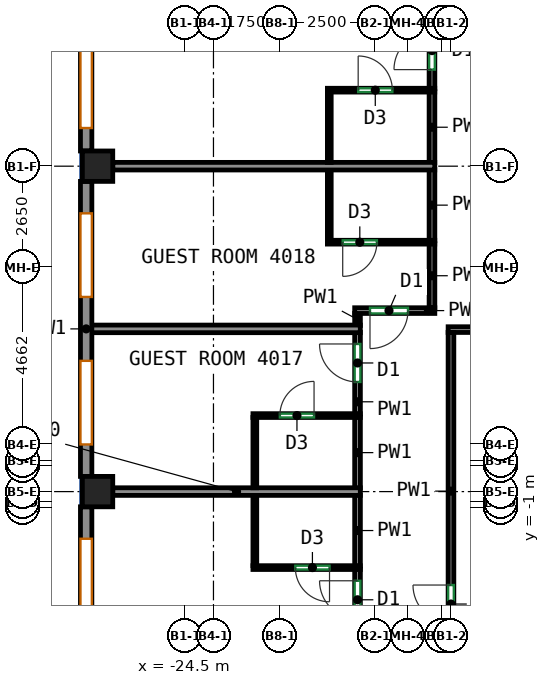
"""IFC4 building model, lengths in metres.
Left out: names, types, materials, properties, quantities, classifications, styles, units other than length and angle.
Written with IfcOpenShell. Run it as: python <this file> out.ifc"""

import sys

from ifc_helpers import new_model, si_unit, direction, frame, frame_2d, origin, origin_2d, place, context, subcontext, project, spatial, rectangle, extrude, source, transform, mapped, element, fill, save


model = new_model("IFC4")
c1 = context("Model", 3, precision=1e-05, world=origin(), true_north=direction((0.0, 1.0)))
c2 = subcontext(c1, "Body", "Model", "MODEL_VIEW")
j1 = project(units=[si_unit("LENGTHUNIT", "METRE"), si_unit("PLANEANGLEUNIT", "RADIAN")], contexts=[c1])
p1 = place(None, origin())
s1 = spatial("IfcSite", under=j1, at=p1, CompositionType="ELEMENT")
p2 = place(p1, origin())
s2 = spatial("IfcBuilding", under=s1, at=p2, CompositionType="ELEMENT")
p3 = place(p2, frame((0.0, 0.0, 171.9)))
s3 = spatial("IfcBuildingStorey", under=s2, at=p3, CompositionType="ELEMENT", Elevation=171.9)
m1 = source(origin(), c2, "Body", "SweptSolid", [
    extrude(rectangle(XDim=0.8, YDim=0.8, at=origin_2d()), origin(), (0.0, 0.0, 1.0), 3.12),
])
for number, where, z_axis, x_axis in (
    (1, (-26.8, -0.562, 0.0), (0.0, 0.0, 1.0), (1.0, 0.0, 0.0)),
    (2, (-26.8, 8.0, 0.0), (0.0, 0.0, 1.0), (1.0, 0.0, 0.0)),
):
    element("IfcColumn", number, at=place(p3, frame(where, z_axis=z_axis, x_axis=x_axis)), inside=s3, PredefinedType="COLUMN", context=c2, shape_type="MappedRepresentation", body=[
        mapped(m1, transform((0.0, 0.0, 0.0))),
    ])
m2 = source(origin(), c2, "Body", "SweptSolid", [
    extrude(rectangle(XDim=13.632, YDim=0.3, at=frame_2d((6.816, 0.0))), origin(), (0.0, 0.0, 1.0), 3.12),
])
p4 = place(p3, frame((-27.1, 22.032, 0.0), z_axis=(0.0, 0.0, 1.0), x_axis=(0.0, -1.0, 0.0)))
e3 = element("IfcWall", 3, at=p4, inside=s3, PredefinedType="SOLIDWALL", context=c2, shape_type="MappedRepresentation", body=[
    mapped(m2, transform((0.0, 0.0, 0.0))),
])
p5 = place(p4, frame((0.604, 0.0, 0.85)))
e4 = element("IfcOpeningElement", 4, at=p5, cuts=e3, PredefinedType="OPENING", context=c2, shape_type="SweptSolid", body=[
    extrude(rectangle(XDim=2.2, YDim=1.95, at=frame_2d((1.1, 0.975))), frame((0.0, 0.16, 0.0), z_axis=(0.0, -1.0, 0.0), x_axis=(1.0, 0.0, 0.0)), (0.0, 0.0, 1.0), 0.32),
])
p6 = place(p4, frame((4.012, 0.0, 0.85)))
e5 = element("IfcOpeningElement", 5, at=p6, cuts=e3, PredefinedType="OPENING", context=c2, shape_type="SweptSolid", body=[
    extrude(rectangle(XDim=2.2, YDim=1.95, at=frame_2d((1.1, 0.975))), frame((0.0, 0.16, 0.0), z_axis=(0.0, -1.0, 0.0), x_axis=(1.0, 0.0, 0.0)), (0.0, 0.0, 1.0), 0.32),
])
p7 = place(p4, frame((7.42, 0.0, 0.85)))
e6 = element("IfcOpeningElement", 6, at=p7, cuts=e3, PredefinedType="OPENING", context=c2, shape_type="SweptSolid", body=[
    extrude(rectangle(XDim=2.2, YDim=1.95, at=frame_2d((1.1, 0.975))), frame((0.0, 0.16, 0.0), z_axis=(0.0, -1.0, 0.0), x_axis=(1.0, 0.0, 0.0)), (0.0, 0.0, 1.0), 0.32),
])
p8 = place(p4, frame((10.828, 0.0, 0.85)))
e7 = element("IfcOpeningElement", 7, at=p8, cuts=e3, PredefinedType="OPENING", context=c2, shape_type="SweptSolid", body=[
    extrude(rectangle(XDim=2.2, YDim=1.95, at=frame_2d((1.1, 0.975))), frame((0.0, 0.16, 0.0), z_axis=(0.0, -1.0, 0.0), x_axis=(1.0, 0.0, 0.0)), (0.0, 0.0, 1.0), 0.32),
])
m3 = source(origin(), c2, "Body", "SweptSolid", [
    extrude(rectangle(XDim=7.763, YDim=0.3, at=frame_2d((3.881, 0.0))), origin(), (0.0, 0.0, 1.0), 3.12),
])
p9 = place(p3, frame((-27.1, 7.6, 0.0), z_axis=(0.0, 0.0, 1.0), x_axis=(0.0, -1.0, 0.0)))
e8 = element("IfcWall", 8, at=p9, inside=s3, PredefinedType="SOLIDWALL", context=c2, shape_type="MappedRepresentation", body=[
    mapped(m3, transform((0.0, 0.0, 0.0))),
])
p10 = place(p9, frame((0.841, 0.0, 0.85)))
e9 = element("IfcOpeningElement", 9, at=p10, cuts=e8, PredefinedType="OPENING", context=c2, shape_type="SweptSolid", body=[
    extrude(rectangle(XDim=2.2, YDim=1.95, at=frame_2d((1.1, 0.975))), frame((0.0, 0.16, 0.0), z_axis=(0.0, -1.0, 0.0), x_axis=(1.0, 0.0, 0.0)), (0.0, 0.0, 1.0), 0.32),
])
p11 = place(p9, frame((4.722, 0.0, 0.85)))
e10 = element("IfcOpeningElement", 10, at=p11, cuts=e8, PredefinedType="OPENING", context=c2, shape_type="SweptSolid", body=[
    extrude(rectangle(XDim=2.2, YDim=1.95, at=frame_2d((1.1, 0.975))), frame((0.0, 0.16, 0.0), z_axis=(0.0, -1.0, 0.0), x_axis=(1.0, 0.0, 0.0)), (0.0, 0.0, 1.0), 0.32),
])
p12 = place(p3, frame((-27.1, -0.962, 0.0), z_axis=(0.0, 0.0, 1.0), x_axis=(0.0, -1.0, 0.0)))
e11 = element("IfcWall", 11, at=p12, inside=s3, PredefinedType="SOLIDWALL", context=c2, shape_type="MappedRepresentation", body=[
    mapped(m3, transform((0.0, 0.0, 0.0))),
])
p13 = place(p12, frame((0.841, 0.0, 0.85)))
e12 = element("IfcOpeningElement", 12, at=p13, cuts=e11, PredefinedType="OPENING", context=c2, shape_type="SweptSolid", body=[
    extrude(rectangle(XDim=2.2, YDim=1.95, at=frame_2d((1.1, 0.975))), frame((0.0, 0.16, 0.0), z_axis=(0.0, -1.0, 0.0), x_axis=(1.0, 0.0, 0.0)), (0.0, 0.0, 1.0), 0.32),
])
p14 = place(p12, frame((4.722, 0.0, 0.85)))
e13 = element("IfcOpeningElement", 13, at=p14, cuts=e11, PredefinedType="OPENING", context=c2, shape_type="SweptSolid", body=[
    extrude(rectangle(XDim=2.2, YDim=1.95, at=frame_2d((1.1, 0.975))), frame((0.0, 0.16, 0.0), z_axis=(0.0, -1.0, 0.0), x_axis=(1.0, 0.0, 0.0)), (0.0, 0.0, 1.0), 0.32),
])
p15 = place(p3, frame((-19.959, -4.753, 0.0), z_axis=(0.0, 0.0, 1.0), x_axis=(0.0, 1.0, 0.0)))
e14 = element("IfcWall", 14, at=p15, inside=s3, PredefinedType="PARTITIONING", context=c2, shape_type="SweptSolid", body=[
    extrude(rectangle(XDim=2.151, YDim=0.15, at=frame_2d((1.075, 0.0))), origin(), (0.0, 0.0, 1.0), 3.12),
])
p16 = place(p15, frame((0.844, 0.0, 0.0)))
e15 = element("IfcOpeningElement", 15, at=p16, cuts=e14, PredefinedType="OPENING", context=c2, shape_type="SweptSolid", body=[
    extrude(rectangle(XDim=1.0, YDim=2.1, at=frame_2d((0.5, 1.05))), frame((0.0, 0.085, 0.0), z_axis=(0.0, -1.0, 0.0), x_axis=(1.0, 0.0, 0.0)), (0.0, 0.0, 1.0), 0.17),
])
p17 = place(p3, frame((-19.959, -2.522, 0.0), z_axis=(0.0, 0.0, 1.0), x_axis=(0.0, 1.0, 0.0)))
e16 = element("IfcWall", 16, at=p17, inside=s3, PredefinedType="PARTITIONING", context=c2, shape_type="SweptSolid", body=[
    extrude(rectangle(XDim=1.87, YDim=0.15, at=frame_2d((0.935, 0.0))), origin(), (0.0, 0.0, 1.0), 3.12),
])
p18 = place(p3, frame((-19.959, 1.478, 0.0), z_axis=(0.0, 0.0, 1.0), x_axis=(0.0, 1.0, 0.0)))
e17 = element("IfcWall", 17, at=p18, inside=s3, PredefinedType="PARTITIONING", context=c2, shape_type="SweptSolid", body=[
    extrude(rectangle(XDim=2.151, YDim=0.15, at=frame_2d((1.075, 0.0))), origin(), (0.0, 0.0, 1.0), 3.12),
])
p19 = place(p18, frame((0.844, 0.0, 0.0)))
e18 = element("IfcOpeningElement", 18, at=p19, cuts=e17, PredefinedType="OPENING", context=c2, shape_type="SweptSolid", body=[
    extrude(rectangle(XDim=1.0, YDim=2.1, at=frame_2d((0.5, 1.05))), frame((0.0, 0.085, 0.0), z_axis=(0.0, -1.0, 0.0), x_axis=(1.0, 0.0, 0.0)), (0.0, 0.0, 1.0), 0.17),
])
p20 = place(p3, frame((-19.959, -0.472, 0.0), z_axis=(0.0, 0.0, 1.0), x_axis=(0.0, 1.0, 0.0)))
e19 = element("IfcWall", 19, at=p20, inside=s3, PredefinedType="PARTITIONING", context=c2, shape_type="SweptSolid", body=[
    extrude(rectangle(XDim=1.87, YDim=0.15, at=frame_2d((0.935, 0.0))), origin(), (0.0, 0.0, 1.0), 3.12),
])
p21 = place(p3, frame((-19.959, 3.809, 0.0), z_axis=(0.0, 0.0, 1.0), x_axis=(0.0, 1.0, 0.0)))
e20 = element("IfcWall", 20, at=p21, inside=s3, PredefinedType="PARTITIONING", context=c2, shape_type="SweptSolid", body=[
    extrude(rectangle(XDim=0.316, YDim=0.15, at=frame_2d((0.158, 0.0))), origin(), (0.0, 0.0, 1.0), 3.12),
])
p22 = place(p3, frame((-17.925, 4.2, 0.0), z_axis=(0.0, 0.0, 1.0), x_axis=(-1.0, 0.0, 0.0)))
e21 = element("IfcWall", 21, at=p22, inside=s3, PredefinedType="PARTITIONING", context=c2, shape_type="SweptSolid", body=[
    extrude(rectangle(XDim=2.109, YDim=0.15, at=frame_2d((1.054, 0.0))), origin(), (0.0, 0.0, 1.0), 3.12),
])
p23 = place(p22, frame((0.706, 0.0, 0.0)))
e22 = element("IfcOpeningElement", 22, at=p23, cuts=e21, PredefinedType="OPENING", context=c2, shape_type="SweptSolid", body=[
    extrude(rectangle(XDim=1.0, YDim=2.1, at=frame_2d((0.5, 1.05))), frame((0.0, 0.085, 0.0), z_axis=(0.0, -1.0, 0.0), x_axis=(1.0, 0.0, 0.0)), (0.0, 0.0, 1.0), 0.17),
])
p24 = place(p3, frame((-18.0, 4.275, 0.0), z_axis=(0.0, 0.0, 1.0), x_axis=(0.0, 1.0, 0.0)))
e23 = element("IfcWall", 23, at=p24, inside=s3, PredefinedType="PARTITIONING", context=c2, shape_type="SweptSolid", body=[
    extrude(rectangle(XDim=1.685, YDim=0.15, at=frame_2d((0.843, 0.0))), origin(), (0.0, 0.0, 1.0), 3.12),
])
p25 = place(p3, frame((-18.0, 6.04, 0.0), z_axis=(0.0, 0.0, 1.0), x_axis=(0.0, 1.0, 0.0)))
e24 = element("IfcWall", 24, at=p25, inside=s3, PredefinedType="PARTITIONING", context=c2, shape_type="SweptSolid", body=[
    extrude(rectangle(XDim=1.87, YDim=0.15, at=frame_2d((0.935, 0.0))), origin(), (0.0, 0.0, 1.0), 3.12),
])
p26 = place(p3, frame((-18.0, 10.04, 0.0), z_axis=(0.0, 0.0, 1.0), x_axis=(0.0, 1.0, 0.0)))
e25 = element("IfcWall", 25, at=p26, inside=s3, PredefinedType="PARTITIONING", context=c2, shape_type="SweptSolid", body=[
    extrude(rectangle(XDim=4.707, YDim=0.15, at=frame_2d((2.354, 0.0))), origin(), (0.0, 0.0, 1.0), 3.12),
])
p27 = place(p26, frame((0.501, 0.0, 0.0)))
e26 = element("IfcOpeningElement", 26, at=p27, cuts=e25, PredefinedType="OPENING", context=c2, shape_type="SweptSolid", body=[
    extrude(rectangle(XDim=1.0, YDim=2.1, at=frame_2d((0.5, 1.05))), frame((0.0, 0.085, 0.0), z_axis=(0.0, -1.0, 0.0), x_axis=(1.0, 0.0, 0.0)), (0.0, 0.0, 1.0), 0.17),
])
p28 = place(p3, frame((-18.0, 8.09, 0.0), z_axis=(0.0, 0.0, 1.0), x_axis=(0.0, 1.0, 0.0)))
e27 = element("IfcWall", 27, at=p28, inside=s3, PredefinedType="PARTITIONING", context=c2, shape_type="SweptSolid", body=[
    extrude(rectangle(XDim=1.87, YDim=0.15, at=frame_2d((0.935, 0.0))), origin(), (0.0, 0.0, 1.0), 3.12),
])
p29 = place(p3, frame((-17.575, 3.7, 0.0), z_axis=(0.0, 0.0, 1.0), x_axis=(1.0, 0.0, 0.0)))
e28 = element("IfcWall", 28, at=p29, inside=s3, PredefinedType="PARTITIONING", context=c2, shape_type="SweptSolid", body=[
    extrude(rectangle(XDim=33.85, YDim=0.15, at=frame_2d((16.925, 0.0))), origin(), (0.0, 0.0, 1.0), 3.12),
])
p30 = place(p29, frame((6.596, 0.0, 0.0)))
e29 = element("IfcOpeningElement", 29, at=p30, cuts=e28, PredefinedType="OPENING", context=c2, shape_type="SweptSolid", body=[
    extrude(rectangle(XDim=0.9, YDim=2.1, at=frame_2d((0.45, 1.05))), frame((0.0, 0.085, 0.0), z_axis=(0.0, -1.0, 0.0), x_axis=(1.0, 0.0, 0.0)), (0.0, 0.0, 1.0), 0.17),
])
p31 = place(p29, frame((10.082, 0.0, 0.0)))
e30 = element("IfcOpeningElement", 30, at=p31, cuts=e28, PredefinedType="OPENING", context=c2, shape_type="SweptSolid", body=[
    extrude(rectangle(XDim=0.9, YDim=2.1, at=frame_2d((0.45, 1.05))), frame((0.0, 0.085, 0.0), z_axis=(0.0, -1.0, 0.0), x_axis=(1.0, 0.0, 0.0)), (0.0, 0.0, 1.0), 0.17),
])
p32 = place(p29, frame((21.767, 0.0, 0.0)))
e31 = element("IfcOpeningElement", 31, at=p32, cuts=e28, PredefinedType="OPENING", context=c2, shape_type="SweptSolid", body=[
    extrude(rectangle(XDim=0.9, YDim=2.1, at=frame_2d((0.45, 1.05))), frame((0.0, 0.085, 0.0), z_axis=(0.0, -1.0, 0.0), x_axis=(1.0, 0.0, 0.0)), (0.0, 0.0, 1.0), 0.17),
])
p33 = place(p29, frame((29.649, 0.0, 0.0)))
e32 = element("IfcOpeningElement", 32, at=p33, cuts=e28, PredefinedType="OPENING", context=c2, shape_type="SweptSolid", body=[
    extrude(rectangle(XDim=0.9, YDim=2.1, at=frame_2d((0.45, 1.05))), frame((0.0, 0.085, 0.0), z_axis=(0.0, -1.0, 0.0), x_axis=(1.0, 0.0, 0.0)), (0.0, 0.0, 1.0), 0.17),
])
p34 = place(p3, frame((-17.5, -4.725, 0.0), z_axis=(0.0, 0.0, 1.0), x_axis=(0.0, 1.0, 0.0)))
e33 = element("IfcWall", 33, at=p34, inside=s3, PredefinedType="PARTITIONING", context=c2, shape_type="SweptSolid", body=[
    extrude(rectangle(XDim=8.35, YDim=0.15, at=frame_2d((4.175, 0.0))), origin(), (0.0, 0.0, 1.0), 3.12),
])
p35 = place(p34, frame((0.704, 0.0, 0.0)))
e34 = element("IfcOpeningElement", 34, at=p35, cuts=e33, PredefinedType="OPENING", context=c2, shape_type="SweptSolid", body=[
    extrude(rectangle(XDim=1.0, YDim=2.1, at=frame_2d((0.5, 1.05))), frame((0.0, 0.085, 0.0), z_axis=(0.0, -1.0, 0.0), x_axis=(1.0, 0.0, 0.0)), (0.0, 0.0, 1.0), 0.17),
])
p36 = place(p3, frame((-19.886, -2.562, 0.0), z_axis=(0.0, 0.0, 1.0), x_axis=(-1.0, 0.0, 0.0)))
e35 = element("IfcWall", 35, at=p36, inside=s3, PredefinedType="PARTITIONING", context=c2, shape_type="SweptSolid", body=[
    extrude(rectangle(XDim=2.825, YDim=0.1, at=frame_2d((1.413, 0.0))), origin(), (0.0, 0.0, 1.0), 3.12),
])
p37 = place(p36, frame((0.81, 0.0, 0.0)))
e36 = element("IfcOpeningElement", 36, at=p37, cuts=e35, PredefinedType="OPENING", context=c2, shape_type="SweptSolid", body=[
    extrude(rectangle(XDim=0.9, YDim=2.1, at=frame_2d((0.45, 1.05))), frame((0.0, 0.06, 0.0), z_axis=(0.0, -1.0, 0.0), x_axis=(1.0, 0.0, 0.0)), (0.0, 0.0, 1.0), 0.12),
])
p38 = place(p3, frame((-22.661, -2.512, 0.0), z_axis=(0.0, 0.0, 1.0), x_axis=(0.0, 1.0, 0.0)))
e37 = element("IfcWall", 37, at=p38, inside=s3, PredefinedType="PARTITIONING", context=c2, shape_type="SweptSolid", body=[
    extrude(rectangle(XDim=1.85, YDim=0.1, at=frame_2d((0.925, 0.0))), origin(), (0.0, 0.0, 1.0), 3.12),
])
p39 = place(p3, frame((-26.4, -0.562, 0.0), z_axis=(0.0, 0.0, 1.0), x_axis=(1.0, 0.0, 0.0)))
e38 = element("IfcWall", 38, at=p39, inside=s3, PredefinedType="PARTITIONING", context=c2, shape_type="SweptSolid", body=[
    extrude(rectangle(XDim=6.514, YDim=0.2, at=frame_2d((3.257, 0.0))), origin(), (0.0, 0.0, 1.0), 2.52),
])
p40 = place(p3, frame((-22.711, 1.438, 0.0), z_axis=(0.0, 0.0, 1.0), x_axis=(1.0, 0.0, 0.0)))
e39 = element("IfcWall", 39, at=p40, inside=s3, PredefinedType="PARTITIONING", context=c2, shape_type="SweptSolid", body=[
    extrude(rectangle(XDim=2.825, YDim=0.1, at=frame_2d((1.413, 0.0))), origin(), (0.0, 0.0, 1.0), 3.12),
])
p41 = place(p40, frame((0.708, 0.0, 0.0)))
e40 = element("IfcOpeningElement", 40, at=p41, cuts=e39, PredefinedType="OPENING", context=c2, shape_type="SweptSolid", body=[
    extrude(rectangle(XDim=0.9, YDim=2.1, at=frame_2d((0.45, 1.05))), frame((0.0, 0.06, 0.0), z_axis=(0.0, -1.0, 0.0), x_axis=(1.0, 0.0, 0.0)), (0.0, 0.0, 1.0), 0.12),
])
p42 = place(p3, frame((-22.661, -0.462, 0.0), z_axis=(0.0, 0.0, 1.0), x_axis=(0.0, 1.0, 0.0)))
e41 = element("IfcWall", 41, at=p42, inside=s3, PredefinedType="PARTITIONING", context=c2, shape_type="SweptSolid", body=[
    extrude(rectangle(XDim=1.85, YDim=0.1, at=frame_2d((0.925, 0.0))), origin(), (0.0, 0.0, 1.0), 3.12),
])
p43 = place(p3, frame((-27.0, 3.719, 0.0), z_axis=(0.0, 0.0, 1.0), x_axis=(1.0, 0.0, 0.0)))
e42 = element("IfcWall", 42, at=p43, inside=s3, PredefinedType="PARTITIONING", context=c2, shape_type="SweptSolid", body=[
    extrude(rectangle(XDim=7.114, YDim=0.2, at=frame_2d((3.557, 0.0))), origin(), (0.0, 0.0, 1.0), 3.12),
])
p44 = place(p3, frame((-17.927, 6.0, 0.0), z_axis=(0.0, 0.0, 1.0), x_axis=(-1.0, 0.0, 0.0)))
e43 = element("IfcWall", 43, at=p44, inside=s3, PredefinedType="PARTITIONING", context=c2, shape_type="SweptSolid", body=[
    extrude(rectangle(XDim=2.825, YDim=0.1, at=frame_2d((1.413, 0.0))), origin(), (0.0, 0.0, 1.0), 3.12),
])
p45 = place(p44, frame((1.522, 0.0, 0.0)))
e44 = element("IfcOpeningElement", 44, at=p45, cuts=e43, PredefinedType="OPENING", context=c2, shape_type="SweptSolid", body=[
    extrude(rectangle(XDim=0.9, YDim=2.1, at=frame_2d((0.45, 1.05))), frame((0.0, 0.06, 0.0), z_axis=(0.0, -1.0, 0.0), x_axis=(1.0, 0.0, 0.0)), (0.0, 0.0, 1.0), 0.12),
])
p46 = place(p3, frame((-20.702, 6.05, 0.0), z_axis=(0.0, 0.0, 1.0), x_axis=(0.0, 1.0, 0.0)))
e45 = element("IfcWall", 45, at=p46, inside=s3, PredefinedType="PARTITIONING", context=c2, shape_type="SweptSolid", body=[
    extrude(rectangle(XDim=1.85, YDim=0.1, at=frame_2d((0.925, 0.0))), origin(), (0.0, 0.0, 1.0), 3.12),
])
p47 = place(p3, frame((-26.4, 8.0, 0.0), z_axis=(0.0, 0.0, 1.0), x_axis=(1.0, 0.0, 0.0)))
e46 = element("IfcWall", 46, at=p47, inside=s3, PredefinedType="PARTITIONING", context=c2, shape_type="SweptSolid", body=[
    extrude(rectangle(XDim=8.473, YDim=0.2, at=frame_2d((4.236, 0.0))), origin(), (0.0, 0.0, 1.0), 3.12),
])
p48 = place(p3, frame((-20.752, 10.0, 0.0), z_axis=(0.0, 0.0, 1.0), x_axis=(1.0, 0.0, 0.0)))
e47 = element("IfcWall", 47, at=p48, inside=s3, PredefinedType="PARTITIONING", context=c2, shape_type="SweptSolid", body=[
    extrude(rectangle(XDim=2.825, YDim=0.1, at=frame_2d((1.413, 0.0))), origin(), (0.0, 0.0, 1.0), 3.12),
])
p49 = place(p48, frame((0.81, 0.0, 0.0)))
e48 = element("IfcOpeningElement", 48, at=p49, cuts=e47, PredefinedType="OPENING", context=c2, shape_type="SweptSolid", body=[
    extrude(rectangle(XDim=0.9, YDim=2.1, at=frame_2d((0.45, 1.05))), frame((0.0, 0.06, 0.0), z_axis=(0.0, -1.0, 0.0), x_axis=(1.0, 0.0, 0.0)), (0.0, 0.0, 1.0), 0.12),
])
p50 = place(p3, frame((-20.702, 8.1, 0.0), z_axis=(0.0, 0.0, 1.0), x_axis=(0.0, 1.0, 0.0)))
e49 = element("IfcWall", 49, at=p50, inside=s3, PredefinedType="PARTITIONING", context=c2, shape_type="SweptSolid", body=[
    extrude(rectangle(XDim=1.85, YDim=0.1, at=frame_2d((0.925, 0.0))), origin(), (0.0, 0.0, 1.0), 3.12),
])
p51 = place(p8, origin())
e50 = element("IfcWindow", 50, at=p51, inside=s3, PartitioningType="SINGLE_PANEL", PredefinedType="WINDOW", context=c2, shape_type="SweptSolid", body=[
    extrude(rectangle(XDim=2.2, YDim=1.95, at=frame_2d((1.1, 0.975))), frame((0.0, 0.03, 0.0), z_axis=(0.0, -1.0, 0.0), x_axis=(1.0, 0.0, 0.0)), (0.0, 0.0, 1.0), 0.06),
])
fill(e7, e50)
p52 = place(p10, origin())
e51 = element("IfcWindow", 51, at=p52, inside=s3, PartitioningType="SINGLE_PANEL", PredefinedType="WINDOW", context=c2, shape_type="SweptSolid", body=[
    extrude(rectangle(XDim=2.2, YDim=1.95, at=frame_2d((1.1, 0.975))), frame((0.0, 0.03, 0.0), z_axis=(0.0, -1.0, 0.0), x_axis=(1.0, 0.0, 0.0)), (0.0, 0.0, 1.0), 0.06),
])
fill(e9, e51)
p53 = place(p11, origin())
e52 = element("IfcWindow", 52, at=p53, inside=s3, PartitioningType="SINGLE_PANEL", PredefinedType="WINDOW", context=c2, shape_type="SweptSolid", body=[
    extrude(rectangle(XDim=2.2, YDim=1.95, at=frame_2d((1.1, 0.975))), frame((0.0, 0.03, 0.0), z_axis=(0.0, -1.0, 0.0), x_axis=(1.0, 0.0, 0.0)), (0.0, 0.0, 1.0), 0.06),
])
fill(e10, e52)
p54 = place(p13, origin())
e53 = element("IfcWindow", 53, at=p54, inside=s3, PartitioningType="SINGLE_PANEL", PredefinedType="WINDOW", context=c2, shape_type="SweptSolid", body=[
    extrude(rectangle(XDim=2.2, YDim=1.95, at=frame_2d((1.1, 0.975))), frame((0.0, 0.03, 0.0), z_axis=(0.0, -1.0, 0.0), x_axis=(1.0, 0.0, 0.0)), (0.0, 0.0, 1.0), 0.06),
])
fill(e12, e53)
p55 = place(p35, origin())
e54 = element("IfcDoor", 54, at=p55, inside=s3, OperationType="SINGLE_SWING_RIGHT", PredefinedType="DOOR", context=c2, shape_type="SweptSolid", body=[
    extrude(rectangle(XDim=1.0, YDim=2.1, at=frame_2d((0.5, 1.05))), frame((0.0, 0.025, 0.0), z_axis=(0.0, -1.0, 0.0), x_axis=(1.0, 0.0, 0.0)), (0.0, 0.0, 1.0), 0.05),
])
fill(e34, e54)
p56 = place(p16, origin())
e55 = element("IfcDoor", 55, at=p56, inside=s3, OperationType="SINGLE_SWING_RIGHT", PredefinedType="DOOR", context=c2, shape_type="SweptSolid", body=[
    extrude(rectangle(XDim=1.0, YDim=2.1, at=frame_2d((0.5, 1.05))), frame((0.0, 0.025, 0.0), z_axis=(0.0, -1.0, 0.0), x_axis=(1.0, 0.0, 0.0)), (0.0, 0.0, 1.0), 0.05),
])
fill(e15, e55)
p57 = place(p37, origin())
e56 = element("IfcDoor", 56, at=p57, inside=s3, OperationType="SINGLE_SWING_LEFT", PredefinedType="DOOR", context=c2, shape_type="SweptSolid", body=[
    extrude(rectangle(XDim=0.9, YDim=2.1, at=frame_2d((0.45, 1.05))), frame((0.0, 0.025, 0.0), z_axis=(0.0, -1.0, 0.0), x_axis=(1.0, 0.0, 0.0)), (0.0, 0.0, 1.0), 0.05),
])
fill(e36, e56)
p58 = place(p41, origin())
e57 = element("IfcDoor", 57, at=p58, inside=s3, OperationType="SINGLE_SWING_RIGHT", PredefinedType="DOOR", context=c2, shape_type="SweptSolid", body=[
    extrude(rectangle(XDim=0.9, YDim=2.1, at=frame_2d((0.45, 1.05))), frame((0.0, 0.025, 0.0), z_axis=(0.0, -1.0, 0.0), x_axis=(1.0, 0.0, 0.0)), (0.0, 0.0, 1.0), 0.05),
])
fill(e40, e57)
p59 = place(p19, origin())
e58 = element("IfcDoor", 58, at=p59, inside=s3, OperationType="SINGLE_SWING_RIGHT", PredefinedType="DOOR", context=c2, shape_type="SweptSolid", body=[
    extrude(rectangle(XDim=1.0, YDim=2.1, at=frame_2d((0.5, 1.05))), frame((0.0, 0.025, 0.0), z_axis=(0.0, -1.0, 0.0), x_axis=(1.0, 0.0, 0.0)), (0.0, 0.0, 1.0), 0.05),
])
fill(e18, e58)
p60 = place(p23, origin())
e59 = element("IfcDoor", 59, at=p60, inside=s3, OperationType="SINGLE_SWING_RIGHT", PredefinedType="DOOR", context=c2, shape_type="SweptSolid", body=[
    extrude(rectangle(XDim=1.0, YDim=2.1, at=frame_2d((0.5, 1.05))), frame((0.0, 0.025, 0.0), z_axis=(0.0, -1.0, 0.0), x_axis=(1.0, 0.0, 0.0)), (0.0, 0.0, 1.0), 0.05),
])
fill(e22, e59)
p61 = place(p45, origin())
e60 = element("IfcDoor", 60, at=p61, inside=s3, OperationType="SINGLE_SWING_RIGHT", PredefinedType="DOOR", context=c2, shape_type="SweptSolid", body=[
    extrude(rectangle(XDim=0.9, YDim=2.1, at=frame_2d((0.45, 1.05))), frame((0.0, 0.025, 0.0), z_axis=(0.0, -1.0, 0.0), x_axis=(1.0, 0.0, 0.0)), (0.0, 0.0, 1.0), 0.05),
])
fill(e44, e60)
p62 = place(p49, origin())
e61 = element("IfcDoor", 61, at=p62, inside=s3, OperationType="SINGLE_SWING_LEFT", PredefinedType="DOOR", context=c2, shape_type="SweptSolid", body=[
    extrude(rectangle(XDim=0.9, YDim=2.1, at=frame_2d((0.45, 1.05))), frame((0.0, 0.025, 0.0), z_axis=(0.0, -1.0, 0.0), x_axis=(1.0, 0.0, 0.0)), (0.0, 0.0, 1.0), 0.05),
])
fill(e48, e61)
p63 = place(p27, origin())
e62 = element("IfcDoor", 62, at=p63, inside=s3, OperationType="SINGLE_SWING_LEFT", PredefinedType="DOOR", context=c2, shape_type="SweptSolid", body=[
    extrude(rectangle(XDim=1.0, YDim=2.1, at=frame_2d((0.5, 1.05))), frame((0.0, 0.025, 0.0), z_axis=(0.0, -1.0, 0.0), x_axis=(1.0, 0.0, 0.0)), (0.0, 0.0, 1.0), 0.05),
])
fill(e26, e62)
save(model, sys.argv[1])
